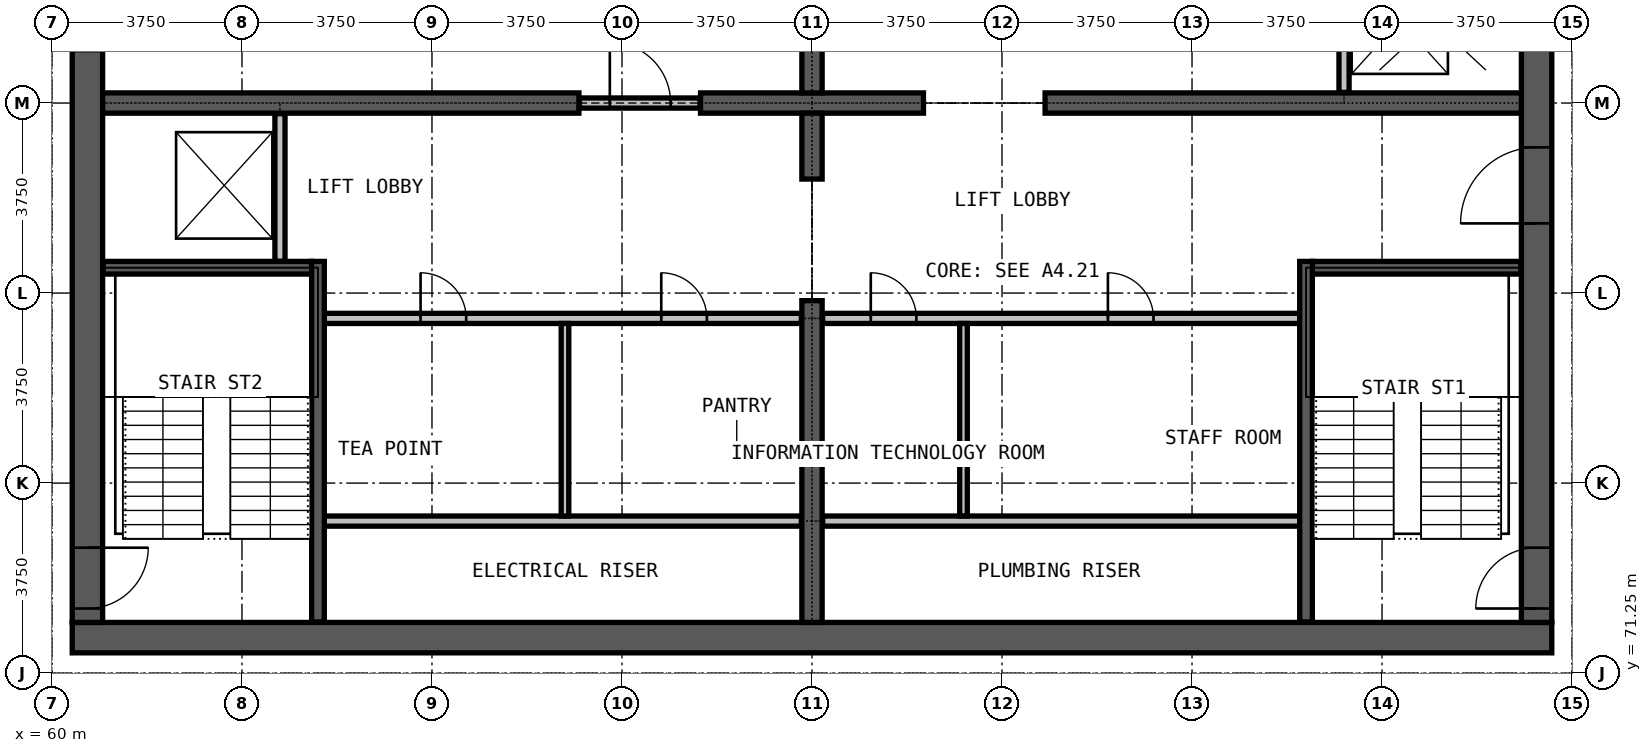
"""IFC4 building model, lengths in metres.
Left out: names, types, materials, properties, quantities, classifications, styles, units other than length and angle.
Written with IfcOpenShell. Run it as: python <this file> out.ifc"""

import sys

from ifc_helpers import new_model, si_unit, direction, frame, frame_2d, origin, place, context, subcontext, project, spatial, rectangle, extrude, element, fill, save


model = new_model("IFC4")
c1 = context("Model", 3, precision=1e-05, world=origin(), true_north=direction((0.0, 1.0)))
c2 = subcontext(c1, "Body", "Model", "MODEL_VIEW")
j1 = project(units=[si_unit("LENGTHUNIT", "METRE"), si_unit("PLANEANGLEUNIT", "RADIAN")], contexts=[c1])
p1 = place(None, origin())
s1 = spatial("IfcSite", under=j1, at=p1, CompositionType="ELEMENT")
p2 = place(p1, origin())
s2 = spatial("IfcBuilding", under=s1, at=p2, CompositionType="ELEMENT")
p3 = place(p2, frame((0.0, 0.0, 224.7)))
s3 = spatial("IfcBuildingStorey", under=s2, at=p3, CompositionType="ELEMENT", Elevation=224.7)
p4 = place(p3, frame((60.4, 71.95, 0.0), z_axis=(0.0, 0.0, 1.0), x_axis=(1.0, 0.0, 0.0)))
e1 = element("IfcWall", 1, at=p4, inside=s3, PredefinedType="SHEAR", context=c2, shape_type="SweptSolid", body=[
    extrude(rectangle(XDim=29.2, YDim=0.6, at=frame_2d((14.6, 0.0))), origin(), (0.0, 0.0, 1.0), 3.6),
])
p5 = place(p3, frame((89.3, 72.25, 0.0), z_axis=(0.0, 0.0, 1.0), x_axis=(0.0, 1.0, 0.0)))
e2 = element("IfcWall", 2, at=p5, inside=s3, PredefinedType="SHEAR", context=c2, shape_type="SweptSolid", body=[
    extrude(rectangle(XDim=20.5, YDim=0.6, at=frame_2d((10.25, 0.0))), origin(), (0.0, 0.0, 1.0), 3.6),
])
p6 = place(p5, frame((0.275, 0.0, 0.0)))
e3 = element("IfcOpeningElement", 3, at=p6, cuts=e2, PredefinedType="OPENING", context=c2, shape_type="SweptSolid", body=[
    extrude(rectangle(XDim=1.2, YDim=2.2, at=frame_2d((0.6, 1.1))), frame((0.0, 0.31, 0.0), z_axis=(0.0, -1.0, 0.0), x_axis=(1.0, 0.0, 0.0)), (0.0, 0.0, 1.0), 0.62),
])
p7 = place(p5, frame((13.775, 0.0, 0.0)))
e4 = element("IfcOpeningElement", 4, at=p7, cuts=e2, PredefinedType="OPENING", context=c2, shape_type="SweptSolid", body=[
    extrude(rectangle(XDim=1.2, YDim=2.2, at=frame_2d((0.6, 1.1))), frame((0.0, 0.31, 0.0), z_axis=(0.0, -1.0, 0.0), x_axis=(1.0, 0.0, 0.0)), (0.0, 0.0, 1.0), 0.62),
])
p8 = place(p5, frame((7.875, 0.0, 0.0)))
e5 = element("IfcOpeningElement", 5, at=p8, cuts=e2, PredefinedType="OPENING", context=c2, shape_type="SweptSolid", body=[
    extrude(rectangle(XDim=1.5, YDim=2.2, at=frame_2d((0.75, 1.1))), frame((0.0, 0.31, 0.0), z_axis=(0.0, -1.0, 0.0), x_axis=(1.0, 0.0, 0.0)), (0.0, 0.0, 1.0), 0.62),
])
p9 = place(p3, frame((60.7, 92.75, 0.0), z_axis=(0.0, 0.0, 1.0), x_axis=(0.0, -1.0, 0.0)))
e6 = element("IfcWall", 6, at=p9, inside=s3, PredefinedType="SHEAR", context=c2, shape_type="SweptSolid", body=[
    extrude(rectangle(XDim=20.5, YDim=0.6, at=frame_2d((10.25, 0.0))), origin(), (0.0, 0.0, 1.0), 3.6),
])
p10 = place(p9, frame((19.025, 0.0, 0.0)))
e7 = element("IfcOpeningElement", 7, at=p10, cuts=e6, PredefinedType="OPENING", context=c2, shape_type="SweptSolid", body=[
    extrude(rectangle(XDim=1.2, YDim=2.2, at=frame_2d((0.6, 1.1))), frame((0.0, 0.31, 0.0), z_axis=(0.0, -1.0, 0.0), x_axis=(1.0, 0.0, 0.0)), (0.0, 0.0, 1.0), 0.62),
])
p11 = place(p9, frame((8.025, 0.0, 0.0)))
e8 = element("IfcOpeningElement", 8, at=p11, cuts=e6, PredefinedType="OPENING", context=c2, shape_type="SweptSolid", body=[
    extrude(rectangle(XDim=1.2, YDim=2.2, at=frame_2d((0.6, 1.1))), frame((0.0, 0.31, 0.0), z_axis=(0.0, -1.0, 0.0), x_axis=(1.0, 0.0, 0.0)), (0.0, 0.0, 1.0), 0.62),
])
p12 = place(p3, frame((61.0, 82.5, 0.0), z_axis=(0.0, 0.0, 1.0), x_axis=(1.0, 0.0, 0.0)))
e9 = element("IfcWall", 9, at=p12, inside=s3, PredefinedType="SHEAR", context=c2, shape_type="SweptSolid", body=[
    extrude(rectangle(XDim=9.4, YDim=0.4, at=frame_2d((4.7, 0.0))), origin(), (0.0, 0.0, 1.0), 3.6),
])
p13 = place(p3, frame((72.8, 82.5, 0.0), z_axis=(0.0, 0.0, 1.0), x_axis=(1.0, 0.0, 0.0)))
e10 = element("IfcWall", 10, at=p13, inside=s3, PredefinedType="SHEAR", context=c2, shape_type="SweptSolid", body=[
    extrude(rectangle(XDim=4.4, YDim=0.4, at=frame_2d((2.2, 0.0))), origin(), (0.0, 0.0, 1.0), 3.6),
])
p14 = place(p3, frame((79.6, 82.5, 0.0), z_axis=(0.0, 0.0, 1.0), x_axis=(1.0, 0.0, 0.0)))
e11 = element("IfcWall", 11, at=p14, inside=s3, PredefinedType="SHEAR", context=c2, shape_type="SweptSolid", body=[
    extrude(rectangle(XDim=9.4, YDim=0.4, at=frame_2d((4.7, 0.0))), origin(), (0.0, 0.0, 1.0), 3.6),
])
p15 = place(p3, frame((75.0, 72.25, 0.0), z_axis=(0.0, 0.0, 1.0), x_axis=(0.0, 1.0, 0.0)))
e12 = element("IfcWall", 12, at=p15, inside=s3, PredefinedType="SHEAR", context=c2, shape_type="SweptSolid", body=[
    extrude(rectangle(XDim=6.35, YDim=0.4, at=frame_2d((3.175, 0.0))), origin(), (0.0, 0.0, 1.0), 3.6),
])
for number, where, z_axis, x_axis in (
    (13, (75.0, 81.0, 0.0), (0.0, 0.0, 1.0), (0.0, 1.0, 0.0)),
    (14, (75.0, 82.7, 0.0), (0.0, 0.0, 1.0), (0.0, 1.0, 0.0)),
):
    element("IfcWall", number, at=place(p3, frame(where, z_axis=z_axis, x_axis=x_axis)), inside=s3, PredefinedType="SHEAR", context=c2, shape_type="SweptSolid", body=[
        extrude(rectangle(XDim=1.3, YDim=0.4, at=frame_2d((0.65, 0.0))), origin(), (0.0, 0.0, 1.0), 3.6),
    ])
for number, where, z_axis, x_axis in (
    (15, (65.375, 74.25, 0.0), (0.0, 0.0, 1.0), (1.0, 0.0, 0.0)),
    (16, (75.21, 74.25, 0.0), (0.0, 0.0, 1.0), (1.0, 0.0, 0.0)),
):
    element("IfcWall", number, at=place(p3, frame(where, z_axis=z_axis, x_axis=x_axis)), inside=s3, PredefinedType="PARTITIONING", context=c2, shape_type="SweptSolid", body=[
        extrude(rectangle(XDim=9.415, YDim=0.2, at=frame_2d((4.708, 0.0))), origin(), (0.0, 0.0, 1.0), 3.3),
    ])
p16 = place(p3, frame((65.375, 78.25, 0.0), z_axis=(0.0, 0.0, 1.0), x_axis=(1.0, 0.0, 0.0)))
e17 = element("IfcWall", 17, at=p16, inside=s3, PredefinedType="PARTITIONING", context=c2, shape_type="SweptSolid", body=[
    extrude(rectangle(XDim=9.415, YDim=0.2, at=frame_2d((4.708, 0.0))), origin(), (0.0, 0.0, 1.0), 3.3),
])
p17 = place(p16, frame((1.9, 0.0, 0.0)))
e18 = element("IfcOpeningElement", 18, at=p17, cuts=e17, PredefinedType="OPENING", context=c2, shape_type="SweptSolid", body=[
    extrude(rectangle(XDim=0.9, YDim=2.2, at=frame_2d((0.45, 1.1))), frame((0.0, 0.11, 0.0), z_axis=(0.0, -1.0, 0.0), x_axis=(1.0, 0.0, 0.0)), (0.0, 0.0, 1.0), 0.22),
])
p18 = place(p16, frame((6.65, 0.0, 0.0)))
e19 = element("IfcOpeningElement", 19, at=p18, cuts=e17, PredefinedType="OPENING", context=c2, shape_type="SweptSolid", body=[
    extrude(rectangle(XDim=0.9, YDim=2.2, at=frame_2d((0.45, 1.1))), frame((0.0, 0.11, 0.0), z_axis=(0.0, -1.0, 0.0), x_axis=(1.0, 0.0, 0.0)), (0.0, 0.0, 1.0), 0.22),
])
p19 = place(p3, frame((75.21, 78.25, 0.0), z_axis=(0.0, 0.0, 1.0), x_axis=(1.0, 0.0, 0.0)))
e20 = element("IfcWall", 20, at=p19, inside=s3, PredefinedType="PARTITIONING", context=c2, shape_type="SweptSolid", body=[
    extrude(rectangle(XDim=9.415, YDim=0.2, at=frame_2d((4.708, 0.0))), origin(), (0.0, 0.0, 1.0), 3.3),
])
p20 = place(p19, frame((0.95, 0.0, 0.0)))
e21 = element("IfcOpeningElement", 21, at=p20, cuts=e20, PredefinedType="OPENING", context=c2, shape_type="SweptSolid", body=[
    extrude(rectangle(XDim=0.9, YDim=2.2, at=frame_2d((0.45, 1.1))), frame((0.0, 0.11, 0.0), z_axis=(0.0, -1.0, 0.0), x_axis=(1.0, 0.0, 0.0)), (0.0, 0.0, 1.0), 0.22),
])
p21 = place(p19, frame((5.63, 0.0, 0.0)))
e22 = element("IfcOpeningElement", 22, at=p21, cuts=e20, PredefinedType="OPENING", context=c2, shape_type="SweptSolid", body=[
    extrude(rectangle(XDim=0.9, YDim=2.2, at=frame_2d((0.45, 1.1))), frame((0.0, 0.11, 0.0), z_axis=(0.0, -1.0, 0.0), x_axis=(1.0, 0.0, 0.0)), (0.0, 0.0, 1.0), 0.22),
])
p22 = place(p3, frame((70.41, 82.5, 0.0), z_axis=(0.0, 0.0, 1.0), x_axis=(1.0, 0.0, 0.0)))
e23 = element("IfcWall", 23, at=p22, inside=s3, PredefinedType="PARTITIONING", context=c2, shape_type="SweptSolid", body=[
    extrude(rectangle(XDim=2.38, YDim=0.2, at=frame_2d((1.19, 0.0))), origin(), (0.0, 0.0, 1.0), 2.4),
])
p23 = place(p22, frame((0.6, 0.0, 0.0)))
e24 = element("IfcOpeningElement", 24, at=p23, cuts=e23, PredefinedType="OPENING", context=c2, shape_type="SweptSolid", body=[
    extrude(rectangle(XDim=1.2, YDim=2.2, at=frame_2d((0.6, 1.1))), frame((0.0, 0.11, 0.0), z_axis=(0.0, -1.0, 0.0), x_axis=(1.0, 0.0, 0.0)), (0.0, 0.0, 1.0), 0.22),
])
for number, where, z_axis, x_axis in (
    (25, (70.125, 74.35, 0.0), (0.0, 0.0, 1.0), (0.0, 1.0, 0.0)),
    (26, (77.99, 74.35, 0.0), (0.0, 0.0, 1.0), (0.0, 1.0, 0.0)),
):
    element("IfcWall", number, at=place(p3, frame(where, z_axis=z_axis, x_axis=x_axis)), inside=s3, PredefinedType="PARTITIONING", context=c2, shape_type="SweptSolid", body=[
        extrude(rectangle(XDim=3.8, YDim=0.15, at=frame_2d((1.9, 0.0))), origin(), (0.0, 0.0, 1.0), 3.3),
    ])
p24 = place(p3, frame((64.5, 79.375, 0.0), z_axis=(0.0, 0.0, 1.0), x_axis=(0.0, 1.0, 0.0)))
e27 = element("IfcWall", 27, at=p24, inside=s3, PredefinedType="PARTITIONING", context=c2, shape_type="SweptSolid", body=[
    extrude(rectangle(XDim=2.915, YDim=0.2, at=frame_2d((1.458, 0.0))), origin(), (0.0, 0.0, 1.0), 3.3),
])
p25 = place(p3, frame((85.5, 82.71, 0.0), z_axis=(0.0, 0.0, 1.0), x_axis=(0.0, 1.0, 0.0)))
e28 = element("IfcWall", 28, at=p25, inside=s3, PredefinedType="PARTITIONING", context=c2, shape_type="SweptSolid", body=[
    extrude(rectangle(XDim=2.915, YDim=0.2, at=frame_2d((1.458, 0.0))), origin(), (0.0, 0.0, 1.0), 3.3),
])
p26 = place(p25, frame((0.9, 0.0, 0.0)))
e29 = element("IfcOpeningElement", 29, at=p26, cuts=e28, PredefinedType="OPENING", context=c2, shape_type="SweptSolid", body=[
    extrude(rectangle(XDim=1.1, YDim=2.2, at=frame_2d((0.55, 1.1))), frame((0.0, 0.11, 0.0), z_axis=(0.0, -1.0, 0.0), x_axis=(1.0, 0.0, 0.0)), (0.0, 0.0, 1.0), 0.22),
])
for number, where, z_axis, x_axis in (
    (30, (61.01, 79.25, 0.0), (0.0, 0.0, 1.0), (1.0, 0.0, 0.0)),
    (31, (84.875, 79.25, 0.0), (0.0, 0.0, 1.0), (1.0, 0.0, 0.0)),
):
    element("IfcWall", number, at=place(p3, frame(where, z_axis=z_axis, x_axis=x_axis)), inside=s3, PredefinedType="PARTITIONING", context=c2, shape_type="SweptSolid", body=[
        extrude(rectangle(XDim=4.115, YDim=0.25, at=frame_2d((2.058, 0.0))), origin(), (0.0, 0.0, 1.0), 3.3),
    ])
for number, where, z_axis, x_axis in (
    (32, (65.25, 72.26, 0.0), (0.0, 0.0, 1.0), (0.0, 1.0, 0.0)),
    (33, (84.75, 72.26, 0.0), (0.0, 0.0, 1.0), (0.0, 1.0, 0.0)),
):
    element("IfcWall", number, at=place(p3, frame(where, z_axis=z_axis, x_axis=x_axis)), inside=s3, PredefinedType="PARTITIONING", context=c2, shape_type="SweptSolid", body=[
        extrude(rectangle(XDim=7.115, YDim=0.25, at=frame_2d((3.558, 0.0))), origin(), (0.0, 0.0, 1.0), 3.3),
    ])
p27 = place(p23, origin())
e34 = element("IfcDoor", 34, at=p27, inside=s3, OperationType="SINGLE_SWING_LEFT", PredefinedType="DOOR", context=c2, shape_type="SweptSolid", body=[
    extrude(rectangle(XDim=1.2, YDim=2.2, at=frame_2d((0.6, 1.1))), frame((0.0, 0.025, 0.0), z_axis=(0.0, -1.0, 0.0), x_axis=(1.0, 0.0, 0.0)), (0.0, 0.0, 1.0), 0.05),
])
fill(e24, e34)
p28 = place(p6, origin())
e35 = element("IfcDoor", 35, at=p28, inside=s3, OperationType="SINGLE_SWING_LEFT", PredefinedType="DOOR", context=c2, shape_type="SweptSolid", body=[
    extrude(rectangle(XDim=1.2, YDim=2.2, at=frame_2d((0.6, 1.1))), frame((0.0, 0.025, 0.0), z_axis=(0.0, -1.0, 0.0), x_axis=(1.0, 0.0, 0.0)), (0.0, 0.0, 1.0), 0.05),
])
fill(e3, e35)
p29 = place(p10, origin())
e36 = element("IfcDoor", 36, at=p29, inside=s3, OperationType="SINGLE_SWING_LEFT", PredefinedType="DOOR", context=c2, shape_type="SweptSolid", body=[
    extrude(rectangle(XDim=1.2, YDim=2.2, at=frame_2d((0.6, 1.1))), frame((0.0, 0.025, 0.0), z_axis=(0.0, -1.0, 0.0), x_axis=(1.0, 0.0, 0.0)), (0.0, 0.0, 1.0), 0.05),
])
fill(e7, e36)
p30 = place(p8, origin())
e37 = element("IfcDoor", 37, at=p30, inside=s3, OperationType="DOUBLE_DOOR_SINGLE_SWING", PredefinedType="DOOR", context=c2, shape_type="SweptSolid", body=[
    extrude(rectangle(XDim=1.5, YDim=2.2, at=frame_2d((0.75, 1.1))), frame((0.0, 0.025, 0.0), z_axis=(0.0, -1.0, 0.0), x_axis=(1.0, 0.0, 0.0)), (0.0, 0.0, 1.0), 0.05),
])
fill(e5, e37)
p31 = place(p17, origin())
e38 = element("IfcDoor", 38, at=p31, inside=s3, OperationType="SINGLE_SWING_LEFT", PredefinedType="DOOR", context=c2, shape_type="SweptSolid", body=[
    extrude(rectangle(XDim=0.9, YDim=2.2, at=frame_2d((0.45, 1.1))), frame((0.0, 0.025, 0.0), z_axis=(0.0, -1.0, 0.0), x_axis=(1.0, 0.0, 0.0)), (0.0, 0.0, 1.0), 0.05),
])
fill(e18, e38)
p32 = place(p18, origin())
e39 = element("IfcDoor", 39, at=p32, inside=s3, OperationType="SINGLE_SWING_LEFT", PredefinedType="DOOR", context=c2, shape_type="SweptSolid", body=[
    extrude(rectangle(XDim=0.9, YDim=2.2, at=frame_2d((0.45, 1.1))), frame((0.0, 0.025, 0.0), z_axis=(0.0, -1.0, 0.0), x_axis=(1.0, 0.0, 0.0)), (0.0, 0.0, 1.0), 0.05),
])
fill(e19, e39)
p33 = place(p20, origin())
e40 = element("IfcDoor", 40, at=p33, inside=s3, OperationType="SINGLE_SWING_LEFT", PredefinedType="DOOR", context=c2, shape_type="SweptSolid", body=[
    extrude(rectangle(XDim=0.9, YDim=2.2, at=frame_2d((0.45, 1.1))), frame((0.0, 0.025, 0.0), z_axis=(0.0, -1.0, 0.0), x_axis=(1.0, 0.0, 0.0)), (0.0, 0.0, 1.0), 0.05),
])
fill(e21, e40)
p34 = place(p21, origin())
e41 = element("IfcDoor", 41, at=p34, inside=s3, OperationType="SINGLE_SWING_RIGHT", PredefinedType="DOOR", context=c2, shape_type="SweptSolid", body=[
    extrude(rectangle(XDim=0.9, YDim=2.2, at=frame_2d((0.45, 1.1))), frame((0.0, 0.025, 0.0), z_axis=(0.0, -1.0, 0.0), x_axis=(1.0, 0.0, 0.0)), (0.0, 0.0, 1.0), 0.05),
])
fill(e22, e41)
save(model, sys.argv[1])
